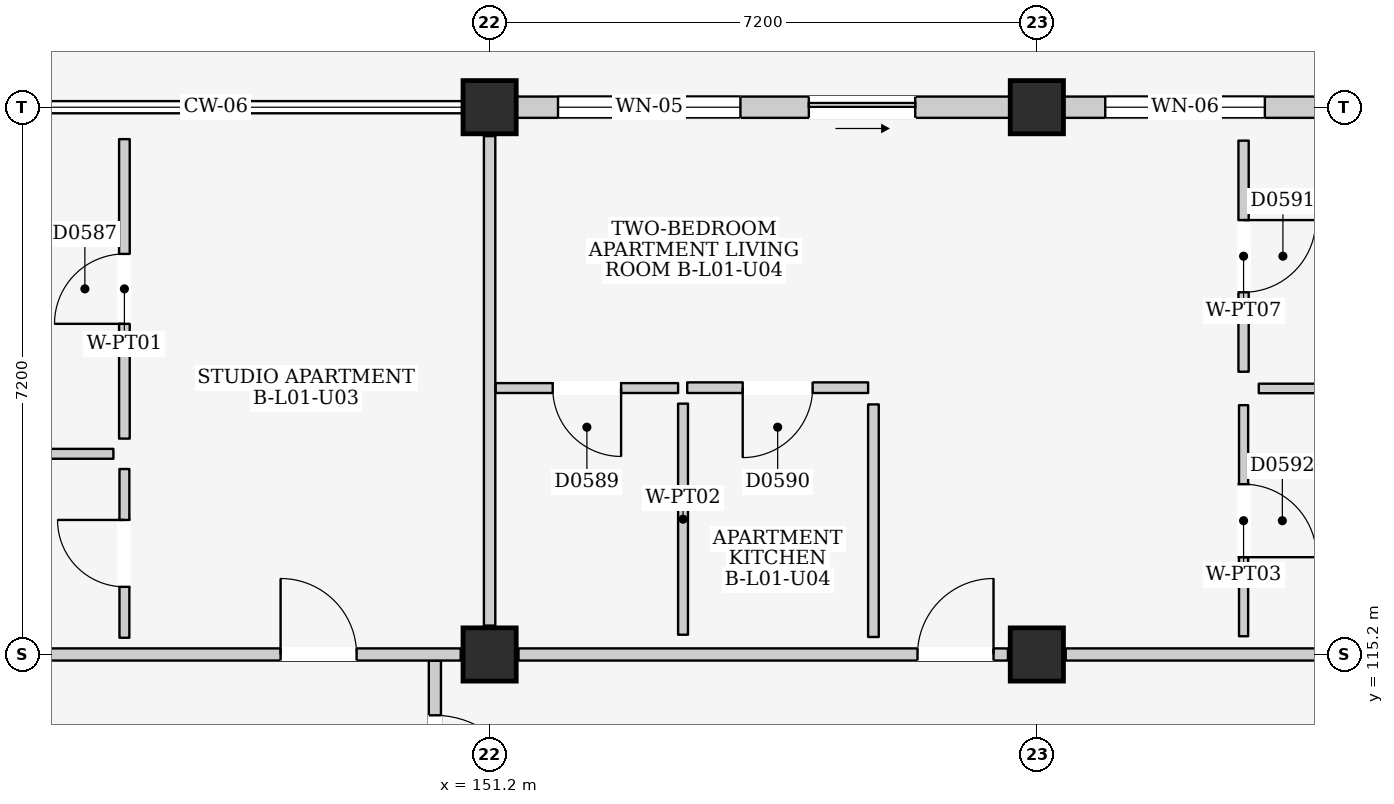
"""IFC4 building model, lengths in metres.
Left out: names, types, materials, properties, quantities, classifications, styles, units other than length and angle.
Written with IfcOpenShell. Run it as: python <this file> out.ifc"""

import sys

from ifc_helpers import new_model, si_unit, direction, frame, frame_2d, origin, origin_2d, place, context, subcontext, project, spatial, rectangle, extrude, element, fill, save


model = new_model("IFC4")
c1 = context("Model", 3, precision=1e-05, world=origin(), true_north=direction((0.0, 1.0)))
c2 = subcontext(c1, "Body", "Model", "MODEL_VIEW")
j1 = project(units=[si_unit("LENGTHUNIT", "METRE"), si_unit("PLANEANGLEUNIT", "RADIAN")], contexts=[c1])
p1 = place(None, origin())
s1 = spatial("IfcSite", under=j1, at=p1, CompositionType="ELEMENT")
p2 = place(p1, origin())
s2 = spatial("IfcBuilding", under=s1, at=p2, CompositionType="ELEMENT")
p3 = place(p2, frame((0.0, 0.0, 4.5)))
s3 = spatial("IfcBuildingStorey", under=s2, at=p3, CompositionType="ELEMENT", Elevation=4.5)
for number, where, z_axis, x_axis in (
    (1, (151.2, 115.2, 0.0), (0.0, 0.0, 1.0), (1.0, 0.0, 0.0)),
    (2, (151.2, 122.4, 0.0), (0.0, 0.0, 1.0), (1.0, 0.0, 0.0)),
    (3, (158.4, 115.2, 0.0), (0.0, 0.0, 1.0), (1.0, 0.0, 0.0)),
    (4, (158.4, 122.4, 0.0), (0.0, 0.0, 1.0), (1.0, 0.0, 0.0)),
):
    element("IfcColumn", number, at=place(p3, frame(where, z_axis=z_axis, x_axis=x_axis)), inside=s3, PredefinedType="COLUMN", context=c2, shape_type="SweptSolid", body=[
        extrude(rectangle(XDim=0.7, YDim=0.7, at=origin_2d()), origin(), (0.0, 0.0, 1.0), 4.5),
    ])
p4 = place(p3, frame((151.55, 122.4, 0.0), z_axis=(0.0, 0.0, 1.0), x_axis=(1.0, 0.0, 0.0)))
e5 = element("IfcWall", 5, at=p4, inside=s3, PredefinedType="ELEMENTEDWALL", context=c2, shape_type="SweptSolid", body=[
    extrude(rectangle(XDim=6.5, YDim=0.28, at=frame_2d((3.25, 0.0))), origin(), (0.0, 0.0, 1.0), 3.715),
])
p5 = place(p4, frame((3.85, 0.0, 0.0)))
e6 = element("IfcOpeningElement", 6, at=p5, cuts=e5, PredefinedType="OPENING", context=c2, shape_type="SweptSolid", body=[
    extrude(rectangle(XDim=1.4, YDim=2.1, at=frame_2d((0.7, 1.05))), frame((0.0, 0.155, 0.0), z_axis=(0.0, -1.0, 0.0), x_axis=(1.0, 0.0, 0.0)), (0.0, 0.0, 1.0), 0.31),
])
p6 = place(p4, frame((0.55, 0.0, 0.9)))
e7 = element("IfcOpeningElement", 7, at=p6, cuts=e5, PredefinedType="OPENING", context=c2, shape_type="SweptSolid", body=[
    extrude(rectangle(XDim=2.4, YDim=1.65, at=frame_2d((1.2, 0.825))), frame((0.0, 0.155, 0.0), z_axis=(0.0, -1.0, 0.0), x_axis=(1.0, 0.0, 0.0)), (0.0, 0.0, 1.0), 0.31),
])
p7 = place(p3, frame((158.75, 122.4, 0.0), z_axis=(0.0, 0.0, 1.0), x_axis=(1.0, 0.0, 0.0)))
e8 = element("IfcWall", 8, at=p7, inside=s3, PredefinedType="ELEMENTEDWALL", context=c2, shape_type="SweptSolid", body=[
    extrude(rectangle(XDim=6.5, YDim=0.28, at=frame_2d((3.25, 0.0))), origin(), (0.0, 0.0, 1.0), 3.715),
])
p8 = place(p7, frame((3.85, 0.0, 0.0)))
e9 = element("IfcOpeningElement", 9, at=p8, cuts=e8, PredefinedType="OPENING", context=c2, shape_type="SweptSolid", body=[
    extrude(rectangle(XDim=1.8, YDim=2.12, at=frame_2d((0.9, 1.06))), frame((0.0, 0.155, 0.0), z_axis=(0.0, -1.0, 0.0), x_axis=(1.0, 0.0, 0.0)), (0.0, 0.0, 1.0), 0.31),
])
p9 = place(p7, frame((0.55, 0.0, 0.9)))
e10 = element("IfcOpeningElement", 10, at=p9, cuts=e8, PredefinedType="OPENING", context=c2, shape_type="SweptSolid", body=[
    extrude(rectangle(XDim=2.1, YDim=1.65, at=frame_2d((1.05, 0.825))), frame((0.0, 0.155, 0.0), z_axis=(0.0, -1.0, 0.0), x_axis=(1.0, 0.0, 0.0)), (0.0, 0.0, 1.0), 0.31),
])
p10 = place(p3, frame((150.48, 111.1, 0.0), z_axis=(0.0, 0.0, 1.0), x_axis=(0.0, 1.0, 0.0)))
e11 = element("IfcWall", 11, at=p10, inside=s3, PredefinedType="PARTITIONING", context=c2, shape_type="SweptSolid", body=[
    extrude(rectangle(XDim=4.02, YDim=0.16, at=frame_2d((2.01, 0.0))), origin(), (0.0, 0.0, 1.0), 4.25),
])
p11 = place(p10, frame((2.1, 0.0, 0.0)))
e12 = element("IfcOpeningElement", 12, at=p11, cuts=e11, PredefinedType="OPENING", context=c2, shape_type="SweptSolid", body=[
    extrude(rectangle(XDim=1.2, YDim=2.2, at=frame_2d((0.6, 1.1))), frame((0.0, 0.095, 0.0), z_axis=(0.0, -1.0, 0.0), x_axis=(1.0, 0.0, 0.0)), (0.0, 0.0, 1.0), 0.19),
])
p12 = place(p3, frame((144.38, 115.2, 0.0), z_axis=(0.0, 0.0, 1.0), x_axis=(1.0, 0.0, 0.0)))
e13 = element("IfcWall", 13, at=p12, inside=s3, PredefinedType="PARTITIONING", context=c2, shape_type="SweptSolid", body=[
    extrude(rectangle(XDim=6.44, YDim=0.16, at=frame_2d((3.22, 0.0))), origin(), (0.0, 0.0, 1.0), 3.635),
])
p13 = place(p12, frame((4.07, 0.0, 0.0)))
e14 = element("IfcOpeningElement", 14, at=p13, cuts=e13, PredefinedType="OPENING", context=c2, shape_type="SweptSolid", body=[
    extrude(rectangle(XDim=1.0, YDim=2.15, at=frame_2d((0.5, 1.075))), frame((0.0, 0.095, 0.0), z_axis=(0.0, -1.0, 0.0), x_axis=(1.0, 0.0, 0.0)), (0.0, 0.0, 1.0), 0.19),
])
p14 = place(p3, frame((151.2, 115.58, 0.0), z_axis=(0.0, 0.0, 1.0), x_axis=(0.0, 1.0, 0.0)))
e15 = element("IfcWall", 15, at=p14, inside=s3, PredefinedType="PARTITIONING", context=c2, shape_type="SweptSolid", body=[
    extrude(rectangle(XDim=6.44, YDim=0.15, at=frame_2d((3.22, 0.0))), origin(), (0.0, 0.0, 1.0), 3.685),
])
p15 = place(p3, frame((144.2, 117.84, 0.0), z_axis=(0.0, 0.0, 1.0), x_axis=(1.0, 0.0, 0.0)))
e16 = element("IfcWall", 16, at=p15, inside=s3, PredefinedType="PARTITIONING", context=c2, shape_type="SweptSolid", body=[
    extrude(rectangle(XDim=2.05, YDim=0.13, at=frame_2d((1.025, 0.0))), origin(), (0.0, 0.0, 1.0), 4.25),
])
p16 = place(p3, frame((146.395, 115.42, 0.0), z_axis=(0.0, 0.0, 1.0), x_axis=(0.0, 1.0, 0.0)))
e17 = element("IfcWall", 17, at=p16, inside=s3, PredefinedType="PARTITIONING", context=c2, shape_type="SweptSolid", body=[
    extrude(rectangle(XDim=2.22, YDim=0.13, at=frame_2d((1.11, 0.0))), origin(), (0.0, 0.0, 1.0), 4.25),
])
p17 = place(p16, frame((0.67, 0.0, 0.0)))
e18 = element("IfcOpeningElement", 18, at=p17, cuts=e17, PredefinedType="OPENING", context=c2, shape_type="SweptSolid", body=[
    extrude(rectangle(XDim=0.88, YDim=2.1, at=frame_2d((0.44, 1.05))), frame((0.0, 0.08, 0.0), z_axis=(0.0, -1.0, 0.0), x_axis=(1.0, 0.0, 0.0)), (0.0, 0.0, 1.0), 0.16),
])
p18 = place(p3, frame((146.395, 118.04, 0.0), z_axis=(0.0, 0.0, 1.0), x_axis=(0.0, 1.0, 0.0)))
e19 = element("IfcWall", 19, at=p18, inside=s3, PredefinedType="PARTITIONING", context=c2, shape_type="SweptSolid", body=[
    extrude(rectangle(XDim=3.94, YDim=0.14, at=frame_2d((1.97, 0.0))), origin(), (0.0, 0.0, 1.0), 4.25),
])
p19 = place(p18, frame((1.51, 0.0, 0.0)))
e20 = element("IfcOpeningElement", 20, at=p19, cuts=e19, PredefinedType="OPENING", context=c2, shape_type="SweptSolid", body=[
    extrude(rectangle(XDim=0.92, YDim=2.1, at=frame_2d((0.46, 1.05))), frame((0.0, 0.085, 0.0), z_axis=(0.0, -1.0, 0.0), x_axis=(1.0, 0.0, 0.0)), (0.0, 0.0, 1.0), 0.17),
])
p20 = place(p3, frame((151.58, 115.2, 0.0), z_axis=(0.0, 0.0, 1.0), x_axis=(1.0, 0.0, 0.0)))
e21 = element("IfcWall", 21, at=p20, inside=s3, PredefinedType="PARTITIONING", context=c2, shape_type="SweptSolid", body=[
    extrude(rectangle(XDim=6.44, YDim=0.16, at=frame_2d((3.22, 0.0))), origin(), (0.0, 0.0, 1.0), 3.635),
])
p21 = place(p20, frame((5.25, 0.0, 0.0)))
e22 = element("IfcOpeningElement", 22, at=p21, cuts=e21, PredefinedType="OPENING", context=c2, shape_type="SweptSolid", body=[
    extrude(rectangle(XDim=1.0, YDim=2.15, at=frame_2d((0.5, 1.075))), frame((0.0, 0.095, 0.0), z_axis=(0.0, -1.0, 0.0), x_axis=(1.0, 0.0, 0.0)), (0.0, 0.0, 1.0), 0.19),
])
p22 = place(p3, frame((158.78, 115.2, 0.0), z_axis=(0.0, 0.0, 1.0), x_axis=(1.0, 0.0, 0.0)))
e23 = element("IfcWall", 23, at=p22, inside=s3, PredefinedType="PARTITIONING", context=c2, shape_type="SweptSolid", body=[
    extrude(rectangle(XDim=6.44, YDim=0.16, at=frame_2d((3.22, 0.0))), origin(), (0.0, 0.0, 1.0), 3.635),
])
p23 = place(p3, frame((151.28, 118.705, 0.0), z_axis=(0.0, 0.0, 1.0), x_axis=(1.0, 0.0, 0.0)))
e24 = element("IfcWall", 24, at=p23, inside=s3, PredefinedType="PARTITIONING", context=c2, shape_type="SweptSolid", body=[
    extrude(rectangle(XDim=2.4, YDim=0.13, at=frame_2d((1.2, 0.0))), origin(), (0.0, 0.0, 1.0), 4.25),
])
p24 = place(p23, frame((0.75, 0.0, 0.0)))
e25 = element("IfcOpeningElement", 25, at=p24, cuts=e24, PredefinedType="OPENING", context=c2, shape_type="SweptSolid", body=[
    extrude(rectangle(XDim=0.9, YDim=2.1, at=frame_2d((0.45, 1.05))), frame((0.0, 0.08, 0.0), z_axis=(0.0, -1.0, 0.0), x_axis=(1.0, 0.0, 0.0)), (0.0, 0.0, 1.0), 0.16),
])
p25 = place(p3, frame((153.745, 115.46, 0.0), z_axis=(0.0, 0.0, 1.0), x_axis=(0.0, 1.0, 0.0)))
e26 = element("IfcWall", 26, at=p25, inside=s3, PredefinedType="PARTITIONING", context=c2, shape_type="SweptSolid", body=[
    extrude(rectangle(XDim=3.04, YDim=0.13, at=frame_2d((1.52, 0.0))), origin(), (0.0, 0.0, 1.0), 4.25),
])
p26 = place(p3, frame((153.8, 118.71, 0.0), z_axis=(0.0, 0.0, 1.0), x_axis=(1.0, 0.0, 0.0)))
e27 = element("IfcWall", 27, at=p26, inside=s3, PredefinedType="PARTITIONING", context=c2, shape_type="SweptSolid", body=[
    extrude(rectangle(XDim=2.38, YDim=0.14, at=frame_2d((1.19, 0.0))), origin(), (0.0, 0.0, 1.0), 4.25),
])
p27 = place(p26, frame((0.73, 0.0, 0.0)))
e28 = element("IfcOpeningElement", 28, at=p27, cuts=e27, PredefinedType="OPENING", context=c2, shape_type="SweptSolid", body=[
    extrude(rectangle(XDim=0.92, YDim=2.1, at=frame_2d((0.46, 1.05))), frame((0.0, 0.085, 0.0), z_axis=(0.0, -1.0, 0.0), x_axis=(1.0, 0.0, 0.0)), (0.0, 0.0, 1.0), 0.17),
])
p28 = place(p3, frame((156.25, 115.43, 0.0), z_axis=(0.0, 0.0, 1.0), x_axis=(0.0, 1.0, 0.0)))
e29 = element("IfcWall", 29, at=p28, inside=s3, PredefinedType="PARTITIONING", context=c2, shape_type="SweptSolid", body=[
    extrude(rectangle(XDim=3.06, YDim=0.14, at=frame_2d((1.53, 0.0))), origin(), (0.0, 0.0, 1.0), 4.25),
])
p29 = place(p3, frame((161.12, 118.92, 0.0), z_axis=(0.0, 0.0, 1.0), x_axis=(0.0, 1.0, 0.0)))
e30 = element("IfcWall", 30, at=p29, inside=s3, PredefinedType="PARTITIONING", context=c2, shape_type="SweptSolid", body=[
    extrude(rectangle(XDim=3.04, YDim=0.135, at=frame_2d((1.52, 0.0))), origin(), (0.0, 0.0, 1.0), 4.25),
])
p30 = place(p29, frame((1.045, 0.0, 0.0)))
e31 = element("IfcOpeningElement", 31, at=p30, cuts=e30, PredefinedType="OPENING", context=c2, shape_type="SweptSolid", body=[
    extrude(rectangle(XDim=0.95, YDim=2.15, at=frame_2d((0.475, 1.075))), frame((0.0, 0.083, 0.0), z_axis=(0.0, -1.0, 0.0), x_axis=(1.0, 0.0, 0.0)), (0.0, 0.0, 1.0), 0.165),
])
p31 = place(p3, frame((161.32, 118.7, 0.0), z_axis=(0.0, 0.0, 1.0), x_axis=(1.0, 0.0, 0.0)))
e32 = element("IfcWall", 32, at=p31, inside=s3, PredefinedType="PARTITIONING", context=c2, shape_type="SweptSolid", body=[
    extrude(rectangle(XDim=4.06, YDim=0.125, at=frame_2d((2.03, 0.0))), origin(), (0.0, 0.0, 1.0), 4.25),
])
p32 = place(p3, frame((161.12, 115.44, 0.0), z_axis=(0.0, 0.0, 1.0), x_axis=(0.0, 1.0, 0.0)))
e33 = element("IfcWall", 33, at=p32, inside=s3, PredefinedType="PARTITIONING", context=c2, shape_type="SweptSolid", body=[
    extrude(rectangle(XDim=3.04, YDim=0.12, at=frame_2d((1.52, 0.0))), origin(), (0.0, 0.0, 1.0), 4.25),
])
p33 = place(p32, frame((1.04, 0.0, 0.0)))
e34 = element("IfcOpeningElement", 34, at=p33, cuts=e33, PredefinedType="OPENING", context=c2, shape_type="SweptSolid", body=[
    extrude(rectangle(XDim=0.96, YDim=2.15, at=frame_2d((0.48, 1.075))), frame((0.0, 0.075, 0.0), z_axis=(0.0, -1.0, 0.0), x_axis=(1.0, 0.0, 0.0)), (0.0, 0.0, 1.0), 0.15),
])
p34 = place(p5, frame((1.4, 0.0, 0.0), z_axis=(0.0, 0.0, 1.0), x_axis=(-1.0, 0.0, 0.0)))
e35 = element("IfcDoor", 35, at=p34, inside=s3, OperationType="SLIDING_TO_RIGHT", PredefinedType="DOOR", context=c2, shape_type="SweptSolid", body=[
    extrude(rectangle(XDim=1.4, YDim=2.1, at=frame_2d((0.7, 1.05))), frame((0.0, 0.025, 0.0), z_axis=(0.0, -1.0, 0.0), x_axis=(1.0, 0.0, 0.0)), (0.0, 0.0, 1.0), 0.05),
])
fill(e6, e35)
p35 = place(p6, origin())
e36 = element("IfcWindow", 36, at=p35, inside=s3, PartitioningType="TRIPLE_PANEL_VERTICAL", PredefinedType="WINDOW", context=c2, shape_type="SweptSolid", body=[
    extrude(rectangle(XDim=2.4, YDim=1.65, at=frame_2d((1.2, 0.825))), frame((0.0, 0.03, 0.0), z_axis=(0.0, -1.0, 0.0), x_axis=(1.0, 0.0, 0.0)), (0.0, 0.0, 1.0), 0.06),
])
fill(e7, e36)
p36 = place(p9, origin())
e37 = element("IfcWindow", 37, at=p36, inside=s3, PartitioningType="DOUBLE_PANEL_VERTICAL", PredefinedType="WINDOW", context=c2, shape_type="SweptSolid", body=[
    extrude(rectangle(XDim=2.1, YDim=1.65, at=frame_2d((1.05, 0.825))), frame((0.0, 0.03, 0.0), z_axis=(0.0, -1.0, 0.0), x_axis=(1.0, 0.0, 0.0)), (0.0, 0.0, 1.0), 0.06),
])
fill(e10, e37)
p37 = place(p11, frame((1.2, 0.0, 0.0), z_axis=(0.0, 0.0, 1.0), x_axis=(-1.0, 0.0, 0.0)))
e38 = element("IfcDoor", 38, at=p37, inside=s3, OperationType="SINGLE_SWING_RIGHT", PredefinedType="DOOR", context=c2, shape_type="SweptSolid", body=[
    extrude(rectangle(XDim=1.2, YDim=2.2, at=frame_2d((0.6, 1.1))), frame((0.0, 0.025, 0.0), z_axis=(0.0, -1.0, 0.0), x_axis=(1.0, 0.0, 0.0)), (0.0, 0.0, 1.0), 0.05),
])
fill(e12, e38)
p38 = place(p13, origin())
e39 = element("IfcDoor", 39, at=p38, inside=s3, OperationType="SINGLE_SWING_LEFT", PredefinedType="DOOR", context=c2, shape_type="SweptSolid", body=[
    extrude(rectangle(XDim=1.0, YDim=2.15, at=frame_2d((0.5, 1.075))), frame((0.0, 0.025, 0.0), z_axis=(0.0, -1.0, 0.0), x_axis=(1.0, 0.0, 0.0)), (0.0, 0.0, 1.0), 0.05),
])
fill(e14, e39)
p39 = place(p17, origin())
e40 = element("IfcDoor", 40, at=p39, inside=s3, OperationType="SINGLE_SWING_RIGHT", PredefinedType="DOOR", context=c2, shape_type="SweptSolid", body=[
    extrude(rectangle(XDim=0.88, YDim=2.1, at=frame_2d((0.44, 1.05))), frame((0.0, 0.025, 0.0), z_axis=(0.0, -1.0, 0.0), x_axis=(1.0, 0.0, 0.0)), (0.0, 0.0, 1.0), 0.05),
])
fill(e18, e40)
p40 = place(p19, origin())
e41 = element("IfcDoor", 41, at=p40, inside=s3, OperationType="SINGLE_SWING_LEFT", PredefinedType="DOOR", context=c2, shape_type="SweptSolid", body=[
    extrude(rectangle(XDim=0.92, YDim=2.1, at=frame_2d((0.46, 1.05))), frame((0.0, 0.025, 0.0), z_axis=(0.0, -1.0, 0.0), x_axis=(1.0, 0.0, 0.0)), (0.0, 0.0, 1.0), 0.05),
])
fill(e20, e41)
p41 = place(p21, origin())
e42 = element("IfcDoor", 42, at=p41, inside=s3, OperationType="SINGLE_SWING_RIGHT", PredefinedType="DOOR", context=c2, shape_type="SweptSolid", body=[
    extrude(rectangle(XDim=1.0, YDim=2.15, at=frame_2d((0.5, 1.075))), frame((0.0, 0.025, 0.0), z_axis=(0.0, -1.0, 0.0), x_axis=(1.0, 0.0, 0.0)), (0.0, 0.0, 1.0), 0.05),
])
fill(e22, e42)
p42 = place(p24, frame((0.9, 0.0, 0.0), z_axis=(0.0, 0.0, 1.0), x_axis=(-1.0, 0.0, 0.0)))
e43 = element("IfcDoor", 43, at=p42, inside=s3, OperationType="SINGLE_SWING_LEFT", PredefinedType="DOOR", context=c2, shape_type="SweptSolid", body=[
    extrude(rectangle(XDim=0.9, YDim=2.1, at=frame_2d((0.45, 1.05))), frame((0.0, 0.025, 0.0), z_axis=(0.0, -1.0, 0.0), x_axis=(1.0, 0.0, 0.0)), (0.0, 0.0, 1.0), 0.05),
])
fill(e25, e43)
p43 = place(p27, frame((0.92, 0.0, 0.0), z_axis=(0.0, 0.0, 1.0), x_axis=(-1.0, 0.0, 0.0)))
e44 = element("IfcDoor", 44, at=p43, inside=s3, OperationType="SINGLE_SWING_RIGHT", PredefinedType="DOOR", context=c2, shape_type="SweptSolid", body=[
    extrude(rectangle(XDim=0.92, YDim=2.1, at=frame_2d((0.46, 1.05))), frame((0.0, 0.025, 0.0), z_axis=(0.0, -1.0, 0.0), x_axis=(1.0, 0.0, 0.0)), (0.0, 0.0, 1.0), 0.05),
])
fill(e28, e44)
p44 = place(p30, frame((0.95, 0.0, 0.0), z_axis=(0.0, 0.0, 1.0), x_axis=(-1.0, 0.0, 0.0)))
e45 = element("IfcDoor", 45, at=p44, inside=s3, OperationType="SINGLE_SWING_LEFT", PredefinedType="DOOR", context=c2, shape_type="SweptSolid", body=[
    extrude(rectangle(XDim=0.95, YDim=2.15, at=frame_2d((0.475, 1.075))), frame((0.0, 0.025, 0.0), z_axis=(0.0, -1.0, 0.0), x_axis=(1.0, 0.0, 0.0)), (0.0, 0.0, 1.0), 0.05),
])
fill(e31, e45)
p45 = place(p33, frame((0.96, 0.0, 0.0), z_axis=(0.0, 0.0, 1.0), x_axis=(-1.0, 0.0, 0.0)))
e46 = element("IfcDoor", 46, at=p45, inside=s3, OperationType="SINGLE_SWING_RIGHT", PredefinedType="DOOR", context=c2, shape_type="SweptSolid", body=[
    extrude(rectangle(XDim=0.96, YDim=2.15, at=frame_2d((0.48, 1.075))), frame((0.0, 0.025, 0.0), z_axis=(0.0, -1.0, 0.0), x_axis=(1.0, 0.0, 0.0)), (0.0, 0.0, 1.0), 0.05),
])
fill(e34, e46)
save(model, sys.argv[1])
